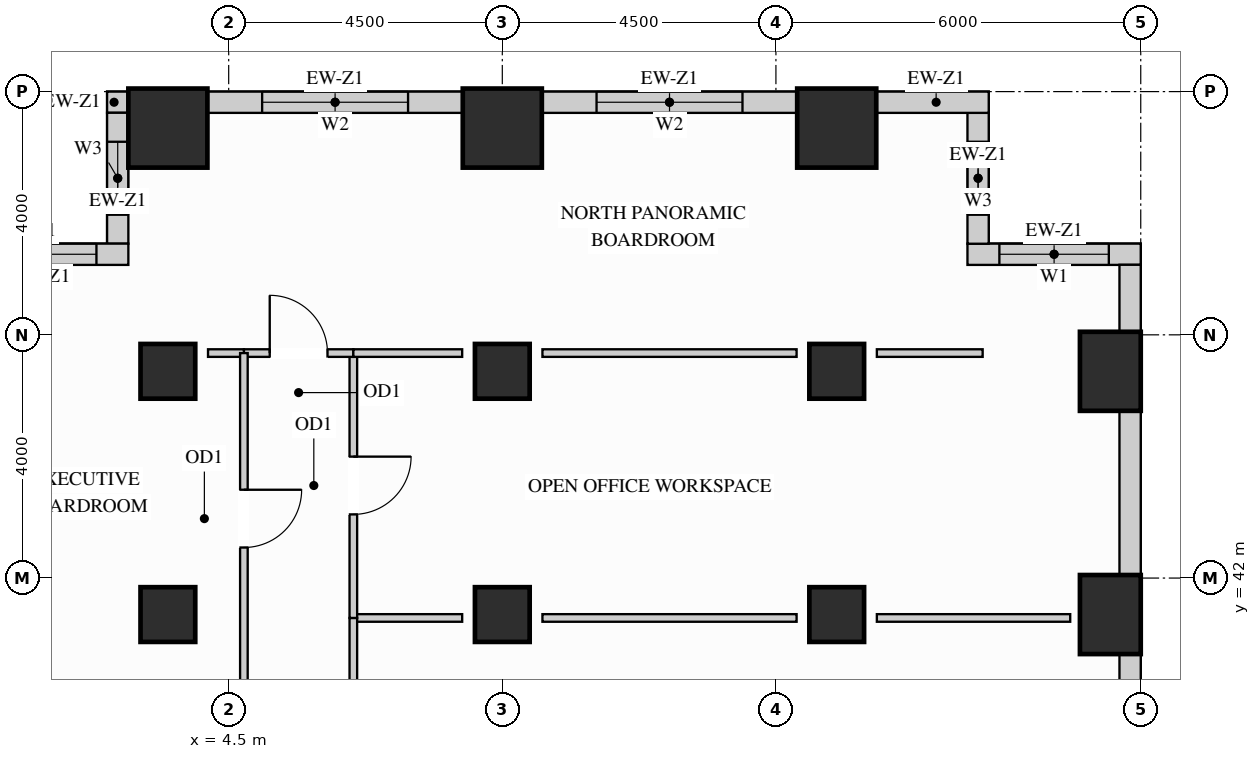
"""IFC4 building model, lengths in metres.
Left out: names, types, materials, properties, quantities, classifications, styles, units other than length and angle.
Written with IfcOpenShell. Run it as: python <this file> out.ifc"""

import sys

from ifc_helpers import new_model, si_unit, direction, frame, frame_2d, origin, origin_2d, place, context, subcontext, project, spatial, rectangle, extrude, source, transform, mapped, element, fill, save


model = new_model("IFC4")
c1 = context("Model", 3, precision=1e-05, world=origin(), true_north=direction((0.0, 1.0)))
c2 = subcontext(c1, "Body", "Model", "MODEL_VIEW")
j1 = project(units=[si_unit("LENGTHUNIT", "METRE"), si_unit("PLANEANGLEUNIT", "RADIAN")], contexts=[c1])
p1 = place(None, origin())
s1 = spatial("IfcSite", under=j1, at=p1, CompositionType="ELEMENT")
p2 = place(p1, origin())
s2 = spatial("IfcBuilding", under=s1, at=p2, CompositionType="ELEMENT")
p3 = place(p2, frame((0.0, 0.0, 22.5)))
s3 = spatial("IfcBuildingStorey", under=s2, at=p3, CompositionType="ELEMENT", Elevation=22.5)
m1 = source(origin(), c2, "Body", "SweptSolid", [
    extrude(rectangle(XDim=0.9, YDim=0.9, at=origin_2d()), origin(), (0.0, 0.0, 1.0), 3.38),
])
for number, where, z_axis, x_axis in (
    (1, (14.5, 41.4, 0.0), (0.0, 0.0, 1.0), (1.0, 0.0, 0.0)),
    (2, (14.5, 45.4, 0.0), (0.0, 0.0, 1.0), (1.0, 0.0, 0.0)),
    (3, (3.5, 41.4, 0.0), (0.0, 0.0, 1.0), (1.0, 0.0, 0.0)),
    (4, (3.5, 45.4, 0.0), (0.0, 0.0, 1.0), (1.0, 0.0, 0.0)),
    (5, (9.0, 41.4, 0.0), (0.0, 0.0, 1.0), (1.0, 0.0, 0.0)),
    (6, (9.0, 45.4, 0.0), (0.0, 0.0, 1.0), (1.0, 0.0, 0.0)),
):
    element("IfcColumn", number, at=place(p3, frame(where, z_axis=z_axis, x_axis=x_axis)), inside=s3, PredefinedType="COLUMN", context=c2, shape_type="MappedRepresentation", body=[
        mapped(m1, transform((0.0, 0.0, 0.0), x_axis=(1.0, 0.0, 0.0), y_axis=(0.0, 1.0, 0.0), z_axis=(0.0, 0.0, 1.0))),
    ])
m2 = source(origin(), c2, "Body", "SweptSolid", [
    extrude(rectangle(XDim=1.0, YDim=1.3, at=origin_2d()), origin(), (0.0, 0.0, 1.0), 3.38),
])
for number, where, z_axis, x_axis in (
    (7, (19.0, 41.4, 0.0), (0.0, 0.0, 1.0), (1.0, 0.0, 0.0)),
    (8, (19.0, 45.4, 0.0), (0.0, 0.0, 1.0), (1.0, 0.0, 0.0)),
):
    element("IfcColumn", number, at=place(p3, frame(where, z_axis=z_axis, x_axis=x_axis)), inside=s3, PredefinedType="COLUMN", context=c2, shape_type="MappedRepresentation", body=[
        mapped(m2, transform((0.0, 0.0, 0.0), x_axis=(1.0, 0.0, 0.0), y_axis=(0.0, 1.0, 0.0), z_axis=(0.0, 0.0, 1.0))),
    ])
m3 = source(origin(), c2, "Body", "SweptSolid", [
    extrude(rectangle(XDim=1.3, YDim=1.3, at=origin_2d()), origin(), (0.0, 0.0, 1.0), 3.38),
])
for number, where, z_axis, x_axis in (
    (9, (14.5, 49.4, 0.0), (0.0, 0.0, 1.0), (1.0, 0.0, 0.0)),
    (10, (3.5, 49.4, 0.0), (0.0, 0.0, 1.0), (1.0, 0.0, 0.0)),
    (11, (9.0, 49.4, 0.0), (0.0, 0.0, 1.0), (1.0, 0.0, 0.0)),
):
    element("IfcColumn", number, at=place(p3, frame(where, z_axis=z_axis, x_axis=x_axis)), inside=s3, PredefinedType="COLUMN", context=c2, shape_type="MappedRepresentation", body=[
        mapped(m3, transform((0.0, 0.0, 0.0), x_axis=(1.0, 0.0, 0.0), y_axis=(0.0, 1.0, 0.0), z_axis=(0.0, 0.0, 1.0))),
    ])
p4 = place(p3, frame((19.5, 47.325, 0.0), z_axis=(0.0, 0.0, 1.0), x_axis=(-1.0, 0.0, 0.0)))
e12 = element("IfcWall", 12, at=p4, inside=s3, PredefinedType="SOLIDWALL", context=c2, shape_type="SweptSolid", body=[
    extrude(rectangle(XDim=2.85, YDim=0.35, at=frame_2d((1.425, 0.0))), origin(), (0.0, 0.0, 1.0), 3.365),
])
p5 = place(p4, frame((0.525, 0.0, 0.78)))
e13 = element("IfcOpeningElement", 13, at=p5, cuts=e12, PredefinedType="OPENING", context=c2, shape_type="SweptSolid", body=[
    extrude(rectangle(XDim=1.8, YDim=2.1, at=frame_2d((0.9, 1.05))), frame((0.0, 0.185, 0.0), z_axis=(0.0, -1.0, 0.0), x_axis=(1.0, 0.0, 0.0)), (0.0, 0.0, 1.0), 0.37),
])
p6 = place(p3, frame((16.825, 47.498, 0.0), z_axis=(0.0, 0.0, 1.0), x_axis=(0.0, 1.0, 0.0)))
e14 = element("IfcWall", 14, at=p6, inside=s3, PredefinedType="SOLIDWALL", context=c2, shape_type="SweptSolid", body=[
    extrude(rectangle(XDim=2.154, YDim=0.35, at=frame_2d((1.077, 0.0))), origin(), (0.0, 0.0, 1.0), 3.365),
])
p7 = place(p6, frame((0.477, 0.0, 0.78)))
e15 = element("IfcOpeningElement", 15, at=p7, cuts=e14, PredefinedType="OPENING", context=c2, shape_type="SweptSolid", body=[
    extrude(rectangle(XDim=1.2, YDim=2.1, at=frame_2d((0.6, 1.05))), frame((0.0, 0.185, 0.0), z_axis=(0.0, -1.0, 0.0), x_axis=(1.0, 0.0, 0.0)), (0.0, 0.0, 1.0), 0.37),
])
m4 = source(origin(), c2, "Body", "SweptSolid", [
    extrude(rectangle(XDim=1.852, YDim=0.35, at=frame_2d((0.926, 0.0))), origin(), (0.0, 0.0, 1.0), 3.365),
])
p8 = place(p3, frame((17.0, 49.825, 0.0), z_axis=(0.0, 0.0, 1.0), x_axis=(-1.0, 0.0, 0.0)))
e16 = element("IfcWall", 16, at=p8, inside=s3, PredefinedType="SOLIDWALL", context=c2, shape_type="MappedRepresentation", body=[
    mapped(m4, transform((0.0, 0.0, 0.0), x_axis=(1.0, 0.0, 0.0), y_axis=(0.0, 1.0, 0.0), z_axis=(0.0, 0.0, 1.0))),
])
p9 = place(p3, frame((13.852, 49.825, 0.0), z_axis=(0.0, 0.0, 1.0), x_axis=(-1.0, 0.0, 0.0)))
e17 = element("IfcWall", 17, at=p9, inside=s3, PredefinedType="SOLIDWALL", context=c2, shape_type="SweptSolid", body=[
    extrude(rectangle(XDim=4.204, YDim=0.35, at=frame_2d((2.102, 0.0))), origin(), (0.0, 0.0, 1.0), 2.51),
])
p10 = place(p9, frame((0.902, 0.0, 0.78)))
e18 = element("IfcOpeningElement", 18, at=p10, cuts=e17, PredefinedType="OPENING", context=c2, shape_type="SweptSolid", body=[
    extrude(rectangle(XDim=2.4, YDim=1.55, at=frame_2d((1.2, 0.775))), frame((0.0, 0.185, 0.0), z_axis=(0.0, -1.0, 0.0), x_axis=(1.0, 0.0, 0.0)), (0.0, 0.0, 1.0), 0.37),
])
p11 = place(p3, frame((8.352, 49.825, 0.0), z_axis=(0.0, 0.0, 1.0), x_axis=(-1.0, 0.0, 0.0)))
e19 = element("IfcWall", 19, at=p11, inside=s3, PredefinedType="SOLIDWALL", context=c2, shape_type="SweptSolid", body=[
    extrude(rectangle(XDim=4.204, YDim=0.35, at=frame_2d((2.102, 0.0))), origin(), (0.0, 0.0, 1.0), 2.51),
])
p12 = place(p11, frame((0.902, 0.0, 0.78)))
e20 = element("IfcOpeningElement", 20, at=p12, cuts=e19, PredefinedType="OPENING", context=c2, shape_type="SweptSolid", body=[
    extrude(rectangle(XDim=2.4, YDim=1.55, at=frame_2d((1.2, 0.775))), frame((0.0, 0.185, 0.0), z_axis=(0.0, -1.0, 0.0), x_axis=(1.0, 0.0, 0.0)), (0.0, 0.0, 1.0), 0.37),
])
m5 = source(origin(), c2, "Body", "SweptSolid", [
    extrude(rectangle(XDim=0.352, YDim=0.35, at=frame_2d((0.176, 0.0))), origin(), (0.0, 0.0, 1.0), 3.365),
])
p13 = place(p3, frame((2.852, 49.825, 0.0), z_axis=(0.0, 0.0, 1.0), x_axis=(-1.0, 0.0, 0.0)))
e21 = element("IfcWall", 21, at=p13, inside=s3, PredefinedType="SOLIDWALL", context=c2, shape_type="MappedRepresentation", body=[
    mapped(m5, transform((0.0, 0.0, 0.0), x_axis=(1.0, 0.0, 0.0), y_axis=(0.0, 1.0, 0.0), z_axis=(0.0, 0.0, 1.0))),
])
p14 = place(p3, frame((2.675, 49.652, 0.0), z_axis=(0.0, 0.0, 1.0), x_axis=(0.0, -1.0, 0.0)))
e22 = element("IfcWall", 22, at=p14, inside=s3, PredefinedType="SOLIDWALL", context=c2, shape_type="SweptSolid", body=[
    extrude(rectangle(XDim=2.154, YDim=0.35, at=frame_2d((1.077, 0.0))), origin(), (0.0, 0.0, 1.0), 3.365),
])
p15 = place(p14, frame((0.477, 0.0, 0.78)))
e23 = element("IfcOpeningElement", 23, at=p15, cuts=e22, PredefinedType="OPENING", context=c2, shape_type="SweptSolid", body=[
    extrude(rectangle(XDim=1.2, YDim=2.1, at=frame_2d((0.6, 1.05))), frame((0.0, 0.185, 0.0), z_axis=(0.0, -1.0, 0.0), x_axis=(1.0, 0.0, 0.0)), (0.0, 0.0, 1.0), 0.37),
])
p16 = place(p3, frame((2.85, 47.325, 0.0), z_axis=(0.0, 0.0, 1.0), x_axis=(-1.0, 0.0, 0.0)))
e24 = element("IfcWall", 24, at=p16, inside=s3, PredefinedType="SOLIDWALL", context=c2, shape_type="SweptSolid", body=[
    extrude(rectangle(XDim=2.85, YDim=0.35, at=frame_2d((1.425, 0.0))), origin(), (0.0, 0.0, 1.0), 3.365),
])
p17 = place(p16, frame((0.525, 0.0, 0.78)))
e25 = element("IfcOpeningElement", 25, at=p17, cuts=e24, PredefinedType="OPENING", context=c2, shape_type="SweptSolid", body=[
    extrude(rectangle(XDim=1.8, YDim=2.1, at=frame_2d((0.9, 1.05))), frame((0.0, 0.185, 0.0), z_axis=(0.0, -1.0, 0.0), x_axis=(1.0, 0.0, 0.0)), (0.0, 0.0, 1.0), 0.37),
])
m6 = source(origin(), c2, "Body", "SweptSolid", [
    extrude(rectangle(XDim=2.204, YDim=0.35, at=frame_2d((1.102, 0.0))), origin(), (0.0, 0.0, 1.0), 2.51),
])
p18 = place(p3, frame((19.325, 38.548, 0.0), z_axis=(0.0, 0.0, 1.0), x_axis=(0.0, 1.0, 0.0)))
e26 = element("IfcWall", 26, at=p18, inside=s3, PredefinedType="SOLIDWALL", context=c2, shape_type="MappedRepresentation", body=[
    mapped(m6, transform((0.0, 0.0, 0.0), x_axis=(1.0, 0.0, 0.0), y_axis=(0.0, 1.0, 0.0), z_axis=(0.0, 0.0, 1.0))),
])
m7 = source(origin(), c2, "Body", "SweptSolid", [
    extrude(rectangle(XDim=2.704, YDim=0.35, at=frame_2d((1.352, 0.0))), origin(), (0.0, 0.0, 1.0), 2.51),
])
p19 = place(p3, frame((19.325, 42.048, 0.0), z_axis=(0.0, 0.0, 1.0), x_axis=(0.0, 1.0, 0.0)))
e27 = element("IfcWall", 27, at=p19, inside=s3, PredefinedType="SOLIDWALL", context=c2, shape_type="MappedRepresentation", body=[
    mapped(m7, transform((0.0, 0.0, 0.0), x_axis=(1.0, 0.0, 0.0), y_axis=(0.0, 1.0, 0.0), z_axis=(0.0, 0.0, 1.0))),
])
m8 = source(origin(), c2, "Body", "SweptSolid", [
    extrude(rectangle(XDim=1.104, YDim=0.35, at=frame_2d((0.552, 0.0))), origin(), (0.0, 0.0, 1.0), 3.365),
])
p20 = place(p3, frame((19.325, 46.048, 0.0), z_axis=(0.0, 0.0, 1.0), x_axis=(0.0, 1.0, 0.0)))
e28 = element("IfcWall", 28, at=p20, inside=s3, PredefinedType="SOLIDWALL", context=c2, shape_type="MappedRepresentation", body=[
    mapped(m8, transform((0.0, 0.0, 0.0), x_axis=(1.0, 0.0, 0.0), y_axis=(0.0, 1.0, 0.0), z_axis=(0.0, 0.0, 1.0))),
])
m9 = source(origin(), c2, "Body", "SweptSolid", [
    extrude(rectangle(XDim=1.79, YDim=0.125, at=frame_2d((0.895, 0.0))), origin(), (0.0, 0.0, 1.0), 2.67),
])
p21 = place(p3, frame((6.55, 41.344, 0.0), z_axis=(0.0, 0.0, 1.0), x_axis=(1.0, 0.0, 0.0)))
e29 = element("IfcWall", 29, at=p21, inside=s3, PredefinedType="PARTITIONING", context=c2, shape_type="MappedRepresentation", body=[
    mapped(m9, transform((0.0, 0.0, 0.0), x_axis=(1.0, 0.0, 0.0), y_axis=(0.0, 1.0, 0.0), z_axis=(0.0, 0.0, 1.0))),
])
m10 = source(origin(), c2, "Body", "SweptSolid", [
    extrude(rectangle(XDim=4.18, YDim=0.125, at=frame_2d((2.09, 0.0))), origin(), (0.0, 0.0, 1.0), 2.67),
])
p22 = place(p3, frame((9.66, 41.344, 0.0), z_axis=(0.0, 0.0, 1.0), x_axis=(1.0, 0.0, 0.0)))
e30 = element("IfcWall", 30, at=p22, inside=s3, PredefinedType="PARTITIONING", context=c2, shape_type="MappedRepresentation", body=[
    mapped(m10, transform((0.0, 0.0, 0.0), x_axis=(1.0, 0.0, 0.0), y_axis=(0.0, 1.0, 0.0), z_axis=(0.0, 0.0, 1.0))),
])
m11 = source(origin(), c2, "Body", "SweptSolid", [
    extrude(rectangle(XDim=3.18, YDim=0.125, at=frame_2d((1.59, 0.0))), origin(), (0.0, 0.0, 1.0), 2.67),
])
p23 = place(p3, frame((15.16, 41.344, 0.0), z_axis=(0.0, 0.0, 1.0), x_axis=(1.0, 0.0, 0.0)))
e31 = element("IfcWall", 31, at=p23, inside=s3, PredefinedType="PARTITIONING", context=c2, shape_type="MappedRepresentation", body=[
    mapped(m11, transform((0.0, 0.0, 0.0), x_axis=(1.0, 0.0, 0.0), y_axis=(0.0, 1.0, 0.0), z_axis=(0.0, 0.0, 1.0))),
])
p24 = place(p3, frame((6.55, 36.427, 0.0), z_axis=(0.0, 0.0, 1.0), x_axis=(0.0, 1.0, 0.0)))
e32 = element("IfcWall", 32, at=p24, inside=s3, PredefinedType="PARTITIONING", context=c2, shape_type="SweptSolid", body=[
    extrude(rectangle(XDim=4.917, YDim=0.125, at=frame_2d((2.458, 0.0))), origin(), (0.0, 0.0, 1.0), 3.365),
])
p25 = place(p24, frame((1.983, 0.0, 0.0)))
e33 = element("IfcOpeningElement", 33, at=p25, cuts=e32, PredefinedType="OPENING", context=c2, shape_type="SweptSolid", body=[
    extrude(rectangle(XDim=0.95, YDim=2.15, at=frame_2d((0.475, 1.075))), frame((0.0, 0.073, 0.0), z_axis=(0.0, -1.0, 0.0), x_axis=(1.0, 0.0, 0.0)), (0.0, 0.0, 1.0), 0.145),
])
p26 = place(p3, frame((6.55, 41.344, 0.0), z_axis=(0.0, 0.0, 1.0), x_axis=(0.0, 1.0, 0.0)))
e34 = element("IfcWall", 34, at=p26, inside=s3, PredefinedType="PARTITIONING", context=c2, shape_type="SweptSolid", body=[
    extrude(rectangle(XDim=4.356, YDim=0.125, at=frame_2d((2.178, 0.0))), origin(), (0.0, 0.0, 1.0), 3.365),
])
p27 = place(p26, frame((1.703, 0.0, 0.0)))
e35 = element("IfcOpeningElement", 35, at=p27, cuts=e34, PredefinedType="OPENING", context=c2, shape_type="SweptSolid", body=[
    extrude(rectangle(XDim=0.95, YDim=2.15, at=frame_2d((0.475, 1.075))), frame((0.0, 0.073, 0.0), z_axis=(0.0, -1.0, 0.0), x_axis=(1.0, 0.0, 0.0)), (0.0, 0.0, 1.0), 0.145),
])
p28 = place(p3, frame((4.75, 45.7, 0.0), z_axis=(0.0, 0.0, 1.0), x_axis=(1.0, 0.0, 0.0)))
e36 = element("IfcWall", 36, at=p28, inside=s3, PredefinedType="PARTITIONING", context=c2, shape_type="SweptSolid", body=[
    extrude(rectangle(XDim=1.8, YDim=0.125, at=frame_2d((0.9, 0.0))), origin(), (0.0, 0.0, 1.0), 2.67),
])
p29 = place(p28, frame((0.425, 0.0, 0.0)))
e37 = element("IfcOpeningElement", 37, at=p29, cuts=e36, PredefinedType="OPENING", context=c2, shape_type="SweptSolid", body=[
    extrude(rectangle(XDim=0.95, YDim=2.15, at=frame_2d((0.475, 1.075))), frame((0.0, 0.073, 0.0), z_axis=(0.0, -1.0, 0.0), x_axis=(1.0, 0.0, 0.0)), (0.0, 0.0, 1.0), 0.145),
])
p30 = place(p3, frame((6.55, 45.7, 0.0), z_axis=(0.0, 0.0, 1.0), x_axis=(1.0, 0.0, 0.0)))
e38 = element("IfcWall", 38, at=p30, inside=s3, PredefinedType="PARTITIONING", context=c2, shape_type="MappedRepresentation", body=[
    mapped(m9, transform((0.0, 0.0, 0.0), x_axis=(1.0, 0.0, 0.0), y_axis=(0.0, 1.0, 0.0), z_axis=(0.0, 0.0, 1.0))),
])
p31 = place(p3, frame((9.66, 45.7, 0.0), z_axis=(0.0, 0.0, 1.0), x_axis=(1.0, 0.0, 0.0)))
e39 = element("IfcWall", 39, at=p31, inside=s3, PredefinedType="PARTITIONING", context=c2, shape_type="MappedRepresentation", body=[
    mapped(m10, transform((0.0, 0.0, 0.0), x_axis=(1.0, 0.0, 0.0), y_axis=(0.0, 1.0, 0.0), z_axis=(0.0, 0.0, 1.0))),
])
m12 = source(origin(), c2, "Body", "SweptSolid", [
    extrude(rectangle(XDim=1.74, YDim=0.125, at=frame_2d((0.87, 0.0))), origin(), (0.0, 0.0, 1.0), 2.67),
])
p32 = place(p3, frame((15.16, 45.7, 0.0), z_axis=(0.0, 0.0, 1.0), x_axis=(1.0, 0.0, 0.0)))
e40 = element("IfcWall", 40, at=p32, inside=s3, PredefinedType="PARTITIONING", context=c2, shape_type="MappedRepresentation", body=[
    mapped(m12, transform((0.0, 0.0, 0.0), x_axis=(1.0, 0.0, 0.0), y_axis=(0.0, 1.0, 0.0), z_axis=(0.0, 0.0, 1.0))),
])
m13 = source(origin(), c2, "Body", "SweptSolid", [
    extrude(rectangle(XDim=0.59, YDim=0.125, at=frame_2d((0.295, 0.0))), origin(), (0.0, 0.0, 1.0), 2.67),
])
p33 = place(p3, frame((4.16, 45.7, 0.0), z_axis=(0.0, 0.0, 1.0), x_axis=(1.0, 0.0, 0.0)))
e41 = element("IfcWall", 41, at=p33, inside=s3, PredefinedType="PARTITIONING", context=c2, shape_type="MappedRepresentation", body=[
    mapped(m13, transform((0.0, 0.0, 0.0), x_axis=(1.0, 0.0, 0.0), y_axis=(0.0, 1.0, 0.0), z_axis=(0.0, 0.0, 1.0))),
])
p34 = place(p3, frame((4.75, 38.394, 0.0), z_axis=(0.0, 0.0, 1.0), x_axis=(0.0, 1.0, 0.0)))
e42 = element("IfcWall", 42, at=p34, inside=s3, PredefinedType="PARTITIONING", context=c2, shape_type="SweptSolid", body=[
    extrude(rectangle(XDim=7.306, YDim=0.125, at=frame_2d((3.653, 0.0))), origin(), (0.0, 0.0, 1.0), 3.365),
])
p35 = place(p34, frame((4.108, 0.0, 0.0)))
e43 = element("IfcOpeningElement", 43, at=p35, cuts=e42, PredefinedType="OPENING", context=c2, shape_type="SweptSolid", body=[
    extrude(rectangle(XDim=0.95, YDim=2.15, at=frame_2d((0.475, 1.075))), frame((0.0, 0.073, 0.0), z_axis=(0.0, -1.0, 0.0), x_axis=(1.0, 0.0, 0.0)), (0.0, 0.0, 1.0), 0.145),
])
m14 = source(origin(), c2, "Body", "SweptSolid", [
    extrude(rectangle(XDim=0.95, YDim=2.15, at=frame_2d((0.475, 1.075))), frame((0.0, 0.025, 0.0), z_axis=(0.0, -1.0, 0.0), x_axis=(1.0, 0.0, 0.0)), (0.0, 0.0, 1.0), 0.05),
])
p36 = place(p27, origin())
e44 = element("IfcDoor", 44, at=p36, inside=s3, OperationType="SINGLE_SWING_RIGHT", PredefinedType="DOOR", context=c2, shape_type="MappedRepresentation", body=[
    mapped(m14, transform((0.0, 0.0, 0.0), x_axis=(1.0, 0.0, 0.0), y_axis=(0.0, 1.0, 0.0), z_axis=(0.0, 0.0, 1.0))),
])
fill(e35, e44)
p37 = place(p29, origin())
e45 = element("IfcDoor", 45, at=p37, inside=s3, OperationType="SINGLE_SWING_LEFT", PredefinedType="DOOR", context=c2, shape_type="MappedRepresentation", body=[
    mapped(m14, transform((0.0, 0.0, 0.0), x_axis=(1.0, 0.0, 0.0), y_axis=(0.0, 1.0, 0.0), z_axis=(0.0, 0.0, 1.0))),
])
fill(e37, e45)
p38 = place(p35, origin())
e46 = element("IfcDoor", 46, at=p38, inside=s3, OperationType="SINGLE_SWING_RIGHT", PredefinedType="DOOR", context=c2, shape_type="MappedRepresentation", body=[
    mapped(m14, transform((0.0, 0.0, 0.0), x_axis=(1.0, 0.0, 0.0), y_axis=(0.0, 1.0, 0.0), z_axis=(0.0, 0.0, 1.0))),
])
fill(e43, e46)
m15 = source(origin(), c2, "Body", "SweptSolid", [
    extrude(rectangle(XDim=1.8, YDim=2.1, at=frame_2d((0.9, 1.05))), frame((0.0, 0.03, 0.0), z_axis=(0.0, -1.0, 0.0), x_axis=(1.0, 0.0, 0.0)), (0.0, 0.0, 1.0), 0.06),
])
p39 = place(p5, origin())
e47 = element("IfcWindow", 47, at=p39, inside=s3, PartitioningType="SINGLE_PANEL", PredefinedType="WINDOW", context=c2, shape_type="MappedRepresentation", body=[
    mapped(m15, transform((0.0, 0.0, 0.0), x_axis=(1.0, 0.0, 0.0), y_axis=(0.0, 1.0, 0.0), z_axis=(0.0, 0.0, 1.0))),
])
fill(e13, e47)
p40 = place(p17, origin())
e48 = element("IfcWindow", 48, at=p40, inside=s3, PartitioningType="SINGLE_PANEL", PredefinedType="WINDOW", context=c2, shape_type="MappedRepresentation", body=[
    mapped(m15, transform((0.0, 0.0, 0.0), x_axis=(1.0, 0.0, 0.0), y_axis=(0.0, 1.0, 0.0), z_axis=(0.0, 0.0, 1.0))),
])
fill(e25, e48)
m16 = source(origin(), c2, "Body", "SweptSolid", [
    extrude(rectangle(XDim=2.4, YDim=1.55, at=frame_2d((1.2, 0.775))), frame((0.0, 0.03, 0.0), z_axis=(0.0, -1.0, 0.0), x_axis=(1.0, 0.0, 0.0)), (0.0, 0.0, 1.0), 0.06),
])
p41 = place(p10, origin())
e49 = element("IfcWindow", 49, at=p41, inside=s3, PartitioningType="SINGLE_PANEL", PredefinedType="WINDOW", context=c2, shape_type="MappedRepresentation", body=[
    mapped(m16, transform((0.0, 0.0, 0.0), x_axis=(1.0, 0.0, 0.0), y_axis=(0.0, 1.0, 0.0), z_axis=(0.0, 0.0, 1.0))),
])
fill(e18, e49)
p42 = place(p12, origin())
e50 = element("IfcWindow", 50, at=p42, inside=s3, PartitioningType="SINGLE_PANEL", PredefinedType="WINDOW", context=c2, shape_type="MappedRepresentation", body=[
    mapped(m16, transform((0.0, 0.0, 0.0), x_axis=(1.0, 0.0, 0.0), y_axis=(0.0, 1.0, 0.0), z_axis=(0.0, 0.0, 1.0))),
])
fill(e20, e50)
m17 = source(origin(), c2, "Body", "SweptSolid", [
    extrude(rectangle(XDim=1.2, YDim=2.1, at=frame_2d((0.6, 1.05))), frame((0.0, 0.03, 0.0), z_axis=(0.0, -1.0, 0.0), x_axis=(1.0, 0.0, 0.0)), (0.0, 0.0, 1.0), 0.06),
])
p43 = place(p7, origin())
e51 = element("IfcWindow", 51, at=p43, inside=s3, PartitioningType="SINGLE_PANEL", PredefinedType="WINDOW", context=c2, shape_type="MappedRepresentation", body=[
    mapped(m17, transform((0.0, 0.0, 0.0), x_axis=(1.0, 0.0, 0.0), y_axis=(0.0, 1.0, 0.0), z_axis=(0.0, 0.0, 1.0))),
])
fill(e15, e51)
p44 = place(p15, origin())
e52 = element("IfcWindow", 52, at=p44, inside=s3, PartitioningType="SINGLE_PANEL", PredefinedType="WINDOW", context=c2, shape_type="MappedRepresentation", body=[
    mapped(m17, transform((0.0, 0.0, 0.0), x_axis=(1.0, 0.0, 0.0), y_axis=(0.0, 1.0, 0.0), z_axis=(0.0, 0.0, 1.0))),
])
fill(e23, e52)
save(model, sys.argv[1])
